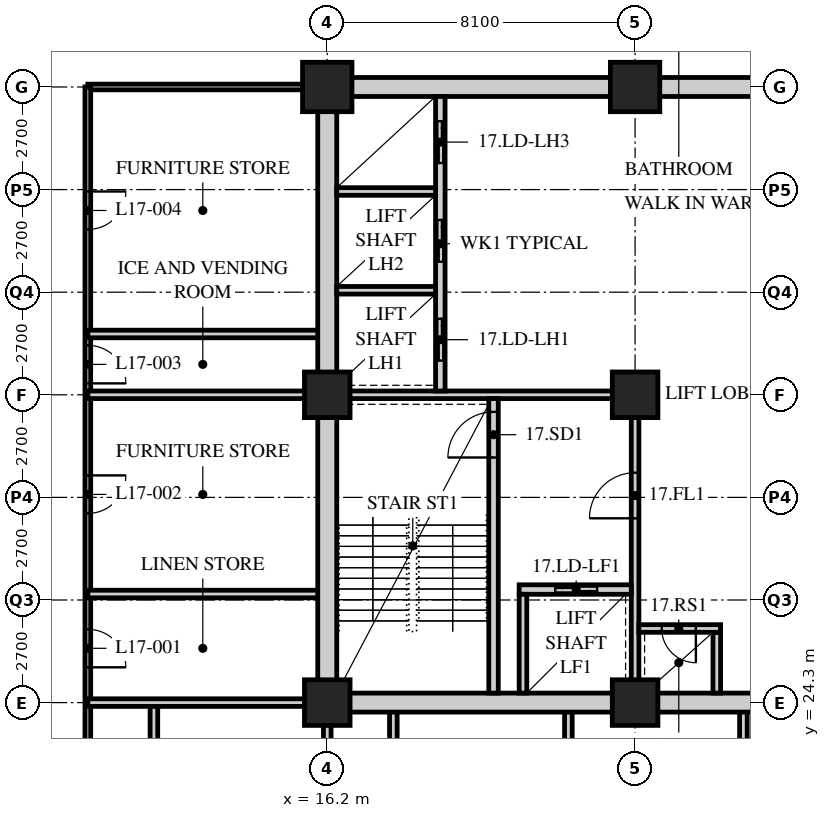
"""IFC4 building model, lengths in metres.
Left out: names, types, materials, properties, quantities, classifications, styles, units other than length and angle.
Written with IfcOpenShell. Run it as: python <this file> out.ifc"""

import sys

from ifc_helpers import new_model, si_unit, direction, frame, frame_2d, origin, origin_2d, place, context, subcontext, project, spatial, rectangle, hollow_rectangle, extrude, element, fill, save


model = new_model("IFC4")
c1 = context("Model", 3, precision=1e-05, world=origin(), true_north=direction((0.0, 1.0)))
c2 = subcontext(c1, "Body", "Model", "MODEL_VIEW")
j1 = project(units=[si_unit("LENGTHUNIT", "METRE"), si_unit("PLANEANGLEUNIT", "RADIAN")], contexts=[c1])
p1 = place(None, origin())
s1 = spatial("IfcSite", under=j1, at=p1, CompositionType="ELEMENT")
p2 = place(p1, origin())
s2 = spatial("IfcBuilding", under=s1, at=p2, CompositionType="ELEMENT")
p3 = place(p2, frame((0.0, 0.0, 70.4)))
s3 = spatial("IfcBuildingStorey", under=s2, at=p3, CompositionType="ELEMENT", Elevation=70.4)
for number, where, z_axis, x_axis in (
    (1, (16.2, 24.3, 0.0), (0.0, 0.0, 1.0), (1.0, 0.0, 0.0)),
    (2, (16.2, 32.4, 0.0), (0.0, 0.0, 1.0), (1.0, 0.0, 0.0)),
):
    element("IfcColumn", number, at=place(p3, frame(where, z_axis=z_axis, x_axis=x_axis)), inside=s3, PredefinedType="COLUMN", context=c2, shape_type="SweptSolid", body=[
        extrude(hollow_rectangle(XDim=1.2, YDim=1.2, WallThickness=0.12, at=origin_2d()), origin(), (0.0, 0.0, 1.0), 3.4),
    ])
p4 = place(p3, frame((16.2, 40.5, 0.0), z_axis=(0.0, 0.0, 1.0), x_axis=(1.0, 0.0, 0.0)))
e3 = element("IfcColumn", 3, at=p4, inside=s3, PredefinedType="COLUMN", context=c2, shape_type="SweptSolid", body=[
    extrude(hollow_rectangle(XDim=1.3, YDim=1.3, WallThickness=0.13, at=origin_2d()), origin(), (0.0, 0.0, 1.0), 3.4),
])
for number, where, z_axis, x_axis in (
    (4, (24.3, 24.3, 0.0), (0.0, 0.0, 1.0), (1.0, 0.0, 0.0)),
    (5, (24.3, 32.4, 0.0), (0.0, 0.0, 1.0), (1.0, 0.0, 0.0)),
):
    element("IfcColumn", number, at=place(p3, frame(where, z_axis=z_axis, x_axis=x_axis)), inside=s3, PredefinedType="COLUMN", context=c2, shape_type="SweptSolid", body=[
        extrude(hollow_rectangle(XDim=1.2, YDim=1.2, WallThickness=0.12, at=origin_2d()), origin(), (0.0, 0.0, 1.0), 3.4),
    ])
p5 = place(p3, frame((24.3, 40.5, 0.0), z_axis=(0.0, 0.0, 1.0), x_axis=(1.0, 0.0, 0.0)))
e6 = element("IfcColumn", 6, at=p5, inside=s3, PredefinedType="COLUMN", context=c2, shape_type="SweptSolid", body=[
    extrude(hollow_rectangle(XDim=1.3, YDim=1.3, WallThickness=0.13, at=origin_2d()), origin(), (0.0, 0.0, 1.0), 3.4),
])
p6 = place(p3, frame((16.0, 40.5, 0.0), z_axis=(0.0, 0.0, 1.0), x_axis=(-1.0, 0.0, 0.0)))
e7 = element("IfcWall", 7, at=p6, inside=s3, PredefinedType="PARTITIONING", context=c2, shape_type="SweptSolid", body=[
    extrude(rectangle(XDim=6.1, YDim=0.15, at=frame_2d((3.05, 0.0))), origin(), (0.0, 0.0, 1.0), 2.578),
])
p7 = place(p3, frame((9.9, 40.5, 0.0), z_axis=(0.0, 0.0, 1.0), x_axis=(0.0, -1.0, 0.0)))
e8 = element("IfcWall", 8, at=p7, inside=s3, PredefinedType="PARTITIONING", context=c2, shape_type="SweptSolid", body=[
    extrude(rectangle(XDim=26.55, YDim=0.15, at=frame_2d((13.275, 0.0))), origin(), (0.0, 0.0, 1.0), 3.19),
])
p8 = place(p7, frame((14.271, 0.0, 0.0)))
e9 = element("IfcOpeningElement", 9, at=p8, cuts=e8, PredefinedType="OPENING", context=c2, shape_type="SweptSolid", body=[
    extrude(rectangle(XDim=1.0, YDim=2.1, at=frame_2d((0.5, 1.05))), frame((0.0, 0.085, 0.0), z_axis=(0.0, -1.0, 0.0), x_axis=(1.0, 0.0, 0.0)), (0.0, 0.0, 1.0), 0.17),
])
p9 = place(p7, frame((10.221, 0.0, 0.0)))
e10 = element("IfcOpeningElement", 10, at=p9, cuts=e8, PredefinedType="OPENING", context=c2, shape_type="SweptSolid", body=[
    extrude(rectangle(XDim=1.0, YDim=2.1, at=frame_2d((0.5, 1.05))), frame((0.0, 0.085, 0.0), z_axis=(0.0, -1.0, 0.0), x_axis=(1.0, 0.0, 0.0)), (0.0, 0.0, 1.0), 0.17),
])
p10 = place(p7, frame((6.8, 0.0, 0.0)))
e11 = element("IfcOpeningElement", 11, at=p10, cuts=e8, PredefinedType="OPENING", context=c2, shape_type="SweptSolid", body=[
    extrude(rectangle(XDim=1.0, YDim=2.1, at=frame_2d((0.5, 1.05))), frame((0.0, 0.085, 0.0), z_axis=(0.0, -1.0, 0.0), x_axis=(1.0, 0.0, 0.0)), (0.0, 0.0, 1.0), 0.17),
])
p11 = place(p7, frame((2.75, 0.0, 0.0)))
e12 = element("IfcOpeningElement", 12, at=p11, cuts=e8, PredefinedType="OPENING", context=c2, shape_type="SweptSolid", body=[
    extrude(rectangle(XDim=1.0, YDim=2.1, at=frame_2d((0.5, 1.05))), frame((0.0, 0.085, 0.0), z_axis=(0.0, -1.0, 0.0), x_axis=(1.0, 0.0, 0.0)), (0.0, 0.0, 1.0), 0.17),
])
p12 = place(p3, frame((9.9, 32.4, 0.0), z_axis=(0.0, 0.0, 1.0), x_axis=(1.0, 0.0, 0.0)))
e13 = element("IfcWall", 13, at=p12, inside=s3, PredefinedType="SOLIDWALL", context=c2, shape_type="SweptSolid", body=[
    extrude(rectangle(XDim=6.3, YDim=0.2, at=frame_2d((3.15, 0.0))), origin(), (0.0, 0.0, 1.0), 2.578),
])
for number, where, z_axis, x_axis in (
    (14, (9.9, 27.157, 0.0), (0.0, 0.0, 1.0), (1.0, 0.0, 0.0)),
    (15, (9.9, 34.0, 0.0), (0.0, 0.0, 1.0), (1.0, 0.0, 0.0)),
):
    element("IfcWall", number, at=place(p3, frame(where, z_axis=z_axis, x_axis=x_axis)), inside=s3, PredefinedType="SOLIDWALL", context=c2, shape_type="SweptSolid", body=[
        extrude(rectangle(XDim=6.3, YDim=0.2, at=frame_2d((3.15, 0.0))), origin(), (0.0, 0.0, 1.0), 3.19),
    ])
p13 = place(p3, frame((16.2, 13.95, 0.0), z_axis=(0.0, 0.0, 1.0), x_axis=(0.0, 1.0, 0.0)))
e16 = element("IfcWall", 16, at=p13, inside=s3, PredefinedType="SOLIDWALL", context=c2, shape_type="SweptSolid", body=[
    extrude(rectangle(XDim=10.35, YDim=0.2, at=frame_2d((5.175, 0.0))), origin(), (0.0, 0.0, 1.0), 2.578),
])
for number, where, z_axis, x_axis in (
    (17, (11.639, 13.95, 0.0), (0.0, 0.0, 1.0), (0.0, 1.0, 0.0)),
    (18, (17.939, 13.95, 0.0), (0.0, 0.0, 1.0), (0.0, 1.0, 0.0)),
    (19, (22.545, 13.95, 0.0), (0.0, 0.0, 1.0), (0.0, 1.0, 0.0)),
    (20, (27.15, 13.95, 0.0), (0.0, 0.0, 1.0), (0.0, 1.0, 0.0)),
):
    element("IfcWall", number, at=place(p3, frame(where, z_axis=z_axis, x_axis=x_axis)), inside=s3, PredefinedType="SOLIDWALL", context=c2, shape_type="SweptSolid", body=[
        extrude(rectangle(XDim=10.35, YDim=0.2, at=frame_2d((5.175, 0.0))), origin(), (0.0, 0.0, 1.0), 3.19),
    ])
p14 = place(p3, frame((9.9, 24.3, 0.0), z_axis=(0.0, 0.0, 1.0), x_axis=(1.0, 0.0, 0.0)))
e21 = element("IfcWall", 21, at=p14, inside=s3, PredefinedType="SOLIDWALL", context=c2, shape_type="SweptSolid", body=[
    extrude(rectangle(XDim=6.3, YDim=0.2, at=frame_2d((3.15, 0.0))), origin(), (0.0, 0.0, 1.0), 2.578),
])
p15 = place(p3, frame((15.95, 24.3, 0.0), z_axis=(0.0, 0.0, 1.0), x_axis=(1.0, 0.0, 0.0)))
e22 = element("IfcWall", 22, at=p15, inside=s3, PredefinedType="SOLIDWALL", context=c2, shape_type="SweptSolid", body=[
    extrude(rectangle(XDim=24.8, YDim=0.5, at=frame_2d((12.4, 0.0))), origin(), (0.0, 0.0, 1.0), 2.54),
])
p16 = place(p15, frame((11.5, 0.0, 0.0)))
e23 = element("IfcOpeningElement", 23, at=p16, cuts=e22, PredefinedType="OPENING", context=c2, shape_type="SweptSolid", body=[
    extrude(rectangle(XDim=1.8, YDim=2.4, at=frame_2d((0.9, 1.2))), frame((0.0, 0.26, 0.0), z_axis=(0.0, -1.0, 0.0), x_axis=(1.0, 0.0, 0.0)), (0.0, 0.0, 1.0), 0.52),
])
p17 = place(p3, frame((15.95, 40.5, 0.0), z_axis=(0.0, 0.0, 1.0), x_axis=(1.0, 0.0, 0.0)))
e24 = element("IfcWall", 24, at=p17, inside=s3, PredefinedType="SOLIDWALL", context=c2, shape_type="SweptSolid", body=[
    extrude(rectangle(XDim=24.8, YDim=0.5, at=frame_2d((12.4, 0.0))), origin(), (0.0, 0.0, 1.0), 2.54),
])
p18 = place(p17, frame((11.5, 0.0, 0.0)))
e25 = element("IfcOpeningElement", 25, at=p18, cuts=e24, PredefinedType="OPENING", context=c2, shape_type="SweptSolid", body=[
    extrude(rectangle(XDim=1.8, YDim=2.4, at=frame_2d((0.9, 1.2))), frame((0.0, 0.26, 0.0), z_axis=(0.0, -1.0, 0.0), x_axis=(1.0, 0.0, 0.0)), (0.0, 0.0, 1.0), 0.52),
])
p19 = place(p3, frame((16.2, 24.55, 0.0), z_axis=(0.0, 0.0, 1.0), x_axis=(0.0, 1.0, 0.0)))
e26 = element("IfcWall", 26, at=p19, inside=s3, PredefinedType="SOLIDWALL", context=c2, shape_type="SweptSolid", body=[
    extrude(rectangle(XDim=15.7, YDim=0.5, at=frame_2d((7.85, 0.0))), origin(), (0.0, 0.0, 1.0), 2.578),
])
p20 = place(p3, frame((16.45, 32.4, 0.0), z_axis=(0.0, 0.0, 1.0), x_axis=(1.0, 0.0, 0.0)))
e27 = element("IfcWall", 27, at=p20, inside=s3, PredefinedType="SOLIDWALL", context=c2, shape_type="SweptSolid", body=[
    extrude(rectangle(XDim=7.95, YDim=0.2, at=frame_2d((3.975, 0.0))), origin(), (0.0, 0.0, 1.0), 2.578),
])
p21 = place(p3, frame((24.3, 24.55, 0.0), z_axis=(0.0, 0.0, 1.0), x_axis=(0.0, 1.0, 0.0)))
e28 = element("IfcWall", 28, at=p21, inside=s3, PredefinedType="SOLIDWALL", context=c2, shape_type="SweptSolid", body=[
    extrude(rectangle(XDim=7.75, YDim=0.2, at=frame_2d((3.875, 0.0))), origin(), (0.0, 0.0, 1.0), 2.578),
])
p22 = place(p21, frame((4.6, 0.0, 0.0)))
e29 = element("IfcOpeningElement", 29, at=p22, cuts=e28, PredefinedType="OPENING", context=c2, shape_type="SweptSolid", body=[
    extrude(rectangle(XDim=1.2, YDim=2.1, at=frame_2d((0.6, 1.05))), frame((0.0, 0.11, 0.0), z_axis=(0.0, -1.0, 0.0), x_axis=(1.0, 0.0, 0.0)), (0.0, 0.0, 1.0), 0.22),
])
p23 = place(p3, frame((20.575, 24.55, 0.0), z_axis=(0.0, 0.0, 1.0), x_axis=(0.0, 1.0, 0.0)))
e30 = element("IfcWall", 30, at=p23, inside=s3, PredefinedType="SOLIDWALL", context=c2, shape_type="SweptSolid", body=[
    extrude(rectangle(XDim=7.75, YDim=0.25, at=frame_2d((3.875, 0.0))), origin(), (0.0, 0.0, 1.0), 3.19),
])
p24 = place(p23, frame((6.2, 0.0, 0.0)))
e31 = element("IfcOpeningElement", 31, at=p24, cuts=e30, PredefinedType="OPENING", context=c2, shape_type="SweptSolid", body=[
    extrude(rectangle(XDim=1.2, YDim=2.1, at=frame_2d((0.6, 1.05))), frame((0.0, 0.135, 0.0), z_axis=(0.0, -1.0, 0.0), x_axis=(1.0, 0.0, 0.0)), (0.0, 0.0, 1.0), 0.27),
])
p25 = place(p3, frame((21.25, 27.275, 0.0), z_axis=(0.0, 0.0, 1.0), x_axis=(1.0, 0.0, 0.0)))
e32 = element("IfcWall", 32, at=p25, inside=s3, PredefinedType="SOLIDWALL", context=c2, shape_type="SweptSolid", body=[
    extrude(rectangle(XDim=2.95, YDim=0.25, at=frame_2d((1.475, 0.0))), origin(), (0.0, 0.0, 1.0), 3.19),
])
p26 = place(p25, frame((0.95, 0.0, 0.0)))
e33 = element("IfcOpeningElement", 33, at=p26, cuts=e32, PredefinedType="OPENING", context=c2, shape_type="SweptSolid", body=[
    extrude(rectangle(XDim=1.1, YDim=2.4, at=frame_2d((0.55, 1.2))), frame((0.0, 0.135, 0.0), z_axis=(0.0, -1.0, 0.0), x_axis=(1.0, 0.0, 0.0)), (0.0, 0.0, 1.0), 0.27),
])
p27 = place(p3, frame((21.35, 24.55, 0.0), z_axis=(0.0, 0.0, 1.0), x_axis=(0.0, 1.0, 0.0)))
e34 = element("IfcWall", 34, at=p27, inside=s3, PredefinedType="SOLIDWALL", context=c2, shape_type="SweptSolid", body=[
    extrude(rectangle(XDim=2.6, YDim=0.2, at=frame_2d((1.3, 0.0))), origin(), (0.0, 0.0, 1.0), 3.19),
])
p28 = place(p3, frame((19.175, 32.5, 0.0), z_axis=(0.0, 0.0, 1.0), x_axis=(0.0, 1.0, 0.0)))
e35 = element("IfcWall", 35, at=p28, inside=s3, PredefinedType="SOLIDWALL", context=c2, shape_type="SweptSolid", body=[
    extrude(rectangle(XDim=7.75, YDim=0.25, at=frame_2d((3.875, 0.0))), origin(), (0.0, 0.0, 1.0), 3.19),
])
p29 = place(p28, frame((0.8, 0.0, 0.0)))
e36 = element("IfcOpeningElement", 36, at=p29, cuts=e35, PredefinedType="OPENING", context=c2, shape_type="SweptSolid", body=[
    extrude(rectangle(XDim=1.1, YDim=2.4, at=frame_2d((0.55, 1.2))), frame((0.0, 0.135, 0.0), z_axis=(0.0, -1.0, 0.0), x_axis=(1.0, 0.0, 0.0)), (0.0, 0.0, 1.0), 0.27),
])
p30 = place(p28, frame((3.4, 0.0, 0.0)))
e37 = element("IfcOpeningElement", 37, at=p30, cuts=e35, PredefinedType="OPENING", context=c2, shape_type="SweptSolid", body=[
    extrude(rectangle(XDim=1.1, YDim=2.4, at=frame_2d((0.55, 1.2))), frame((0.0, 0.135, 0.0), z_axis=(0.0, -1.0, 0.0), x_axis=(1.0, 0.0, 0.0)), (0.0, 0.0, 1.0), 0.27),
])
p31 = place(p28, frame((6.0, 0.0, 0.0)))
e38 = element("IfcOpeningElement", 38, at=p31, cuts=e35, PredefinedType="OPENING", context=c2, shape_type="SweptSolid", body=[
    extrude(rectangle(XDim=1.1, YDim=2.4, at=frame_2d((0.55, 1.2))), frame((0.0, 0.135, 0.0), z_axis=(0.0, -1.0, 0.0), x_axis=(1.0, 0.0, 0.0)), (0.0, 0.0, 1.0), 0.27),
])
for number, where, z_axis, x_axis in (
    (39, (16.45, 35.15, 0.0), (0.0, 0.0, 1.0), (1.0, 0.0, 0.0)),
    (40, (16.45, 37.75, 0.0), (0.0, 0.0, 1.0), (1.0, 0.0, 0.0)),
):
    element("IfcWall", number, at=place(p3, frame(where, z_axis=z_axis, x_axis=x_axis)), inside=s3, PredefinedType="SOLIDWALL", context=c2, shape_type="SweptSolid", body=[
        extrude(rectangle(XDim=2.6, YDim=0.2, at=frame_2d((1.3, 0.0))), origin(), (0.0, 0.0, 1.0), 3.19),
    ])
p32 = place(p3, frame((26.45, 24.55, 0.0), z_axis=(0.0, 0.0, 1.0), x_axis=(0.0, 1.0, 0.0)))
e41 = element("IfcWall", 41, at=p32, inside=s3, PredefinedType="SOLIDWALL", context=c2, shape_type="SweptSolid", body=[
    extrude(rectangle(XDim=1.6, YDim=0.2, at=frame_2d((0.8, 0.0))), origin(), (0.0, 0.0, 1.0), 3.19),
])
p33 = place(p3, frame((24.4, 26.25, 0.0), z_axis=(0.0, 0.0, 1.0), x_axis=(1.0, 0.0, 0.0)))
e42 = element("IfcWall", 42, at=p33, inside=s3, PredefinedType="SOLIDWALL", context=c2, shape_type="SweptSolid", body=[
    extrude(rectangle(XDim=2.15, YDim=0.2, at=frame_2d((1.075, 0.0))), origin(), (0.0, 0.0, 1.0), 3.19),
])
p34 = place(p33, frame((0.6, 0.0, 0.0)))
e43 = element("IfcOpeningElement", 43, at=p34, cuts=e42, PredefinedType="OPENING", context=c2, shape_type="SweptSolid", body=[
    extrude(rectangle(XDim=0.9, YDim=2.1, at=frame_2d((0.45, 1.05))), frame((0.0, 0.11, 0.0), z_axis=(0.0, -1.0, 0.0), x_axis=(1.0, 0.0, 0.0)), (0.0, 0.0, 1.0), 0.22),
])
p35 = place(p8, origin())
e44 = element("IfcDoor", 44, at=p35, inside=s3, OperationType="SINGLE_SWING_RIGHT", PredefinedType="DOOR", context=c2, shape_type="SweptSolid", body=[
    extrude(rectangle(XDim=1.0, YDim=2.1, at=frame_2d((0.5, 1.05))), frame((0.0, 0.025, 0.0), z_axis=(0.0, -1.0, 0.0), x_axis=(1.0, 0.0, 0.0)), (0.0, 0.0, 1.0), 0.05),
])
fill(e9, e44)
p36 = place(p9, origin())
e45 = element("IfcDoor", 45, at=p36, inside=s3, OperationType="SINGLE_SWING_LEFT", PredefinedType="DOOR", context=c2, shape_type="SweptSolid", body=[
    extrude(rectangle(XDim=1.0, YDim=2.1, at=frame_2d((0.5, 1.05))), frame((0.0, 0.025, 0.0), z_axis=(0.0, -1.0, 0.0), x_axis=(1.0, 0.0, 0.0)), (0.0, 0.0, 1.0), 0.05),
])
fill(e10, e45)
p37 = place(p10, origin())
e46 = element("IfcDoor", 46, at=p37, inside=s3, OperationType="SINGLE_SWING_RIGHT", PredefinedType="DOOR", context=c2, shape_type="SweptSolid", body=[
    extrude(rectangle(XDim=1.0, YDim=2.1, at=frame_2d((0.5, 1.05))), frame((0.0, 0.025, 0.0), z_axis=(0.0, -1.0, 0.0), x_axis=(1.0, 0.0, 0.0)), (0.0, 0.0, 1.0), 0.05),
])
fill(e11, e46)
p38 = place(p11, origin())
e47 = element("IfcDoor", 47, at=p38, inside=s3, OperationType="SINGLE_SWING_LEFT", PredefinedType="DOOR", context=c2, shape_type="SweptSolid", body=[
    extrude(rectangle(XDim=1.0, YDim=2.1, at=frame_2d((0.5, 1.05))), frame((0.0, 0.025, 0.0), z_axis=(0.0, -1.0, 0.0), x_axis=(1.0, 0.0, 0.0)), (0.0, 0.0, 1.0), 0.05),
])
fill(e12, e47)
p39 = place(p24, origin())
e48 = element("IfcDoor", 48, at=p39, inside=s3, OperationType="SINGLE_SWING_LEFT", PredefinedType="DOOR", context=c2, shape_type="SweptSolid", body=[
    extrude(rectangle(XDim=1.2, YDim=2.1, at=frame_2d((0.6, 1.05))), frame((0.0, 0.025, 0.0), z_axis=(0.0, -1.0, 0.0), x_axis=(1.0, 0.0, 0.0)), (0.0, 0.0, 1.0), 0.05),
])
fill(e31, e48)
p40 = place(p22, origin())
e49 = element("IfcDoor", 49, at=p40, inside=s3, OperationType="SINGLE_SWING_LEFT", PredefinedType="DOOR", context=c2, shape_type="SweptSolid", body=[
    extrude(rectangle(XDim=1.2, YDim=2.1, at=frame_2d((0.6, 1.05))), frame((0.0, 0.025, 0.0), z_axis=(0.0, -1.0, 0.0), x_axis=(1.0, 0.0, 0.0)), (0.0, 0.0, 1.0), 0.05),
])
fill(e29, e49)
p41 = place(p34, origin())
e50 = element("IfcDoor", 50, at=p41, inside=s3, OperationType="SINGLE_SWING_LEFT", PredefinedType="DOOR", context=c2, shape_type="SweptSolid", body=[
    extrude(rectangle(XDim=0.9, YDim=2.1, at=frame_2d((0.45, 1.05))), frame((0.0, 0.025, 0.0), z_axis=(0.0, -1.0, 0.0), x_axis=(1.0, 0.0, 0.0)), (0.0, 0.0, 1.0), 0.05),
])
fill(e43, e50)
p42 = place(p29, origin())
e51 = element("IfcDoor", 51, at=p42, inside=s3, OperationType="DOUBLE_DOOR_SLIDING", PredefinedType="DOOR", context=c2, shape_type="SweptSolid", body=[
    extrude(rectangle(XDim=1.1, YDim=2.4, at=frame_2d((0.55, 1.2))), frame((0.0, 0.025, 0.0), z_axis=(0.0, -1.0, 0.0), x_axis=(1.0, 0.0, 0.0)), (0.0, 0.0, 1.0), 0.05),
])
fill(e36, e51)
p43 = place(p30, origin())
e52 = element("IfcDoor", 52, at=p43, inside=s3, OperationType="DOUBLE_DOOR_SLIDING", PredefinedType="DOOR", context=c2, shape_type="SweptSolid", body=[
    extrude(rectangle(XDim=1.1, YDim=2.4, at=frame_2d((0.55, 1.2))), frame((0.0, 0.025, 0.0), z_axis=(0.0, -1.0, 0.0), x_axis=(1.0, 0.0, 0.0)), (0.0, 0.0, 1.0), 0.05),
])
fill(e37, e52)
p44 = place(p31, origin())
e53 = element("IfcDoor", 53, at=p44, inside=s3, OperationType="DOUBLE_DOOR_SLIDING", PredefinedType="DOOR", context=c2, shape_type="SweptSolid", body=[
    extrude(rectangle(XDim=1.1, YDim=2.4, at=frame_2d((0.55, 1.2))), frame((0.0, 0.025, 0.0), z_axis=(0.0, -1.0, 0.0), x_axis=(1.0, 0.0, 0.0)), (0.0, 0.0, 1.0), 0.05),
])
fill(e38, e53)
p45 = place(p26, origin())
e54 = element("IfcDoor", 54, at=p45, inside=s3, OperationType="DOUBLE_DOOR_SLIDING", PredefinedType="DOOR", context=c2, shape_type="SweptSolid", body=[
    extrude(rectangle(XDim=1.1, YDim=2.4, at=frame_2d((0.55, 1.2))), frame((0.0, 0.025, 0.0), z_axis=(0.0, -1.0, 0.0), x_axis=(1.0, 0.0, 0.0)), (0.0, 0.0, 1.0), 0.05),
])
fill(e33, e54)
save(model, sys.argv[1])
